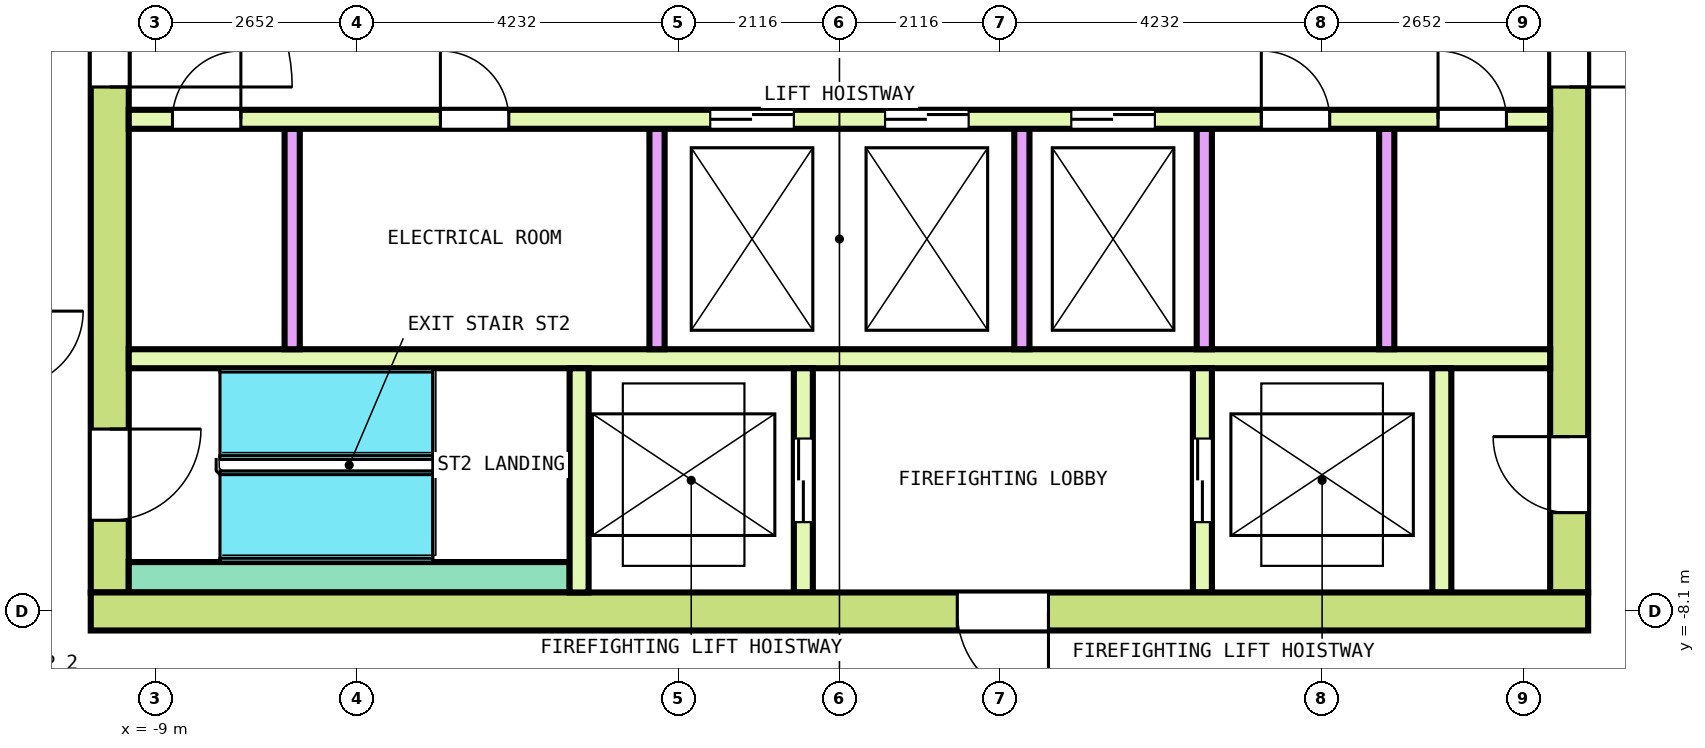
"""IFC4 building model, lengths in metres.
Left out: names, types, materials, properties, quantities, classifications, styles, units other than length and angle.
Written with IfcOpenShell. Run it as: python <this file> out.ifc"""

import sys

from ifc_helpers import new_model, si_unit, direction, frame, frame_2d, origin, place, context, subcontext, project, spatial, rectangle, extrude, element, fill, save


model = new_model("IFC4")
c1 = context("Model", 3, precision=1e-05, world=origin(), true_north=direction((0.0, 1.0)))
c2 = subcontext(c1, "Body", "Model", "MODEL_VIEW")
j1 = project(units=[si_unit("LENGTHUNIT", "METRE"), si_unit("PLANEANGLEUNIT", "RADIAN")], contexts=[c1])
p1 = place(None, origin())
s1 = spatial("IfcSite", under=j1, at=p1, CompositionType="ELEMENT")
p2 = place(p1, origin())
s2 = spatial("IfcBuilding", under=s1, at=p2, CompositionType="ELEMENT")
p3 = place(p2, frame((0.0, 0.0, 340.6)))
s3 = spatial("IfcBuildingStorey", under=s2, at=p3, CompositionType="ELEMENT", Elevation=340.6)
p4 = place(p3, frame((-9.85, -8.1, 0.0), z_axis=(0.0, 0.0, 1.0), x_axis=(1.0, 0.0, 0.0)))
e1 = element("IfcWall", 1, at=p4, inside=s3, PredefinedType="SHEAR", context=c2, shape_type="SweptSolid", body=[
    extrude(rectangle(XDim=19.7, YDim=0.5, at=frame_2d((9.85, 0.0))), origin(), (0.0, 0.0, 1.0), 3.8),
])
p5 = place(p4, frame((11.4, 0.0, 0.0)))
e2 = element("IfcOpeningElement", 2, at=p5, cuts=e1, PredefinedType="OPENING", context=c2, shape_type="SweptSolid", body=[
    extrude(rectangle(XDim=1.2, YDim=2.1, at=frame_2d((0.6, 1.05))), frame((0.0, 0.26, 0.0), z_axis=(0.0, -1.0, 0.0), x_axis=(1.0, 0.0, 0.0)), (0.0, 0.0, 1.0), 0.52),
])
p6 = place(p3, frame((-9.6, -7.85, 0.0), z_axis=(0.0, 0.0, 1.0), x_axis=(0.0, 1.0, 0.0)))
e3 = element("IfcWall", 3, at=p6, inside=s3, PredefinedType="SHEAR", context=c2, shape_type="SweptSolid", body=[
    extrude(rectangle(XDim=15.7, YDim=0.5, at=frame_2d((7.85, 0.0))), origin(), (0.0, 0.0, 1.0), 3.8),
])
p7 = place(p6, frame((6.65, 0.0, 0.0)))
e4 = element("IfcOpeningElement", 4, at=p7, cuts=e3, PredefinedType="OPENING", context=c2, shape_type="SweptSolid", body=[
    extrude(rectangle(XDim=2.4, YDim=2.1, at=frame_2d((1.2, 1.05))), frame((0.0, 0.26, 0.0), z_axis=(0.0, -1.0, 0.0), x_axis=(1.0, 0.0, 0.0)), (0.0, 0.0, 1.0), 0.52),
])
p8 = place(p6, frame((13.55, 0.0, 0.0)))
e5 = element("IfcOpeningElement", 5, at=p8, cuts=e3, PredefinedType="OPENING", context=c2, shape_type="SweptSolid", body=[
    extrude(rectangle(XDim=1.2, YDim=2.1, at=frame_2d((0.6, 1.05))), frame((0.0, 0.26, 0.0), z_axis=(0.0, -1.0, 0.0), x_axis=(1.0, 0.0, 0.0)), (0.0, 0.0, 1.0), 0.52),
])
p9 = place(p6, frame((0.95, 0.0, 0.0)))
e6 = element("IfcOpeningElement", 6, at=p9, cuts=e3, PredefinedType="OPENING", context=c2, shape_type="SweptSolid", body=[
    extrude(rectangle(XDim=1.2, YDim=2.1, at=frame_2d((0.6, 1.05))), frame((0.0, 0.26, 0.0), z_axis=(0.0, -1.0, 0.0), x_axis=(1.0, 0.0, 0.0)), (0.0, 0.0, 1.0), 0.52),
])
p10 = place(p3, frame((9.6, -7.85, 0.0), z_axis=(0.0, 0.0, 1.0), x_axis=(0.0, 1.0, 0.0)))
e7 = element("IfcWall", 7, at=p10, inside=s3, PredefinedType="SHEAR", context=c2, shape_type="SweptSolid", body=[
    extrude(rectangle(XDim=15.7, YDim=0.5, at=frame_2d((7.85, 0.0))), origin(), (0.0, 0.0, 1.0), 3.8),
])
p11 = place(p10, frame((6.65, 0.0, 0.0)))
e8 = element("IfcOpeningElement", 8, at=p11, cuts=e7, PredefinedType="OPENING", context=c2, shape_type="SweptSolid", body=[
    extrude(rectangle(XDim=2.4, YDim=2.1, at=frame_2d((1.2, 1.05))), frame((0.0, 0.26, 0.0), z_axis=(0.0, -1.0, 0.0), x_axis=(1.0, 0.0, 0.0)), (0.0, 0.0, 1.0), 0.52),
])
p12 = place(p10, frame((13.55, 0.0, 0.0)))
e9 = element("IfcOpeningElement", 9, at=p12, cuts=e7, PredefinedType="OPENING", context=c2, shape_type="SweptSolid", body=[
    extrude(rectangle(XDim=1.2, YDim=2.1, at=frame_2d((0.6, 1.05))), frame((0.0, 0.26, 0.0), z_axis=(0.0, -1.0, 0.0), x_axis=(1.0, 0.0, 0.0)), (0.0, 0.0, 1.0), 0.52),
])
p13 = place(p10, frame((1.05, 0.0, 0.0)))
e10 = element("IfcOpeningElement", 10, at=p13, cuts=e7, PredefinedType="OPENING", context=c2, shape_type="SweptSolid", body=[
    extrude(rectangle(XDim=1.0, YDim=2.1, at=frame_2d((0.5, 1.05))), frame((0.0, 0.26, 0.0), z_axis=(0.0, -1.0, 0.0), x_axis=(1.0, 0.0, 0.0)), (0.0, 0.0, 1.0), 0.52),
])
p14 = place(p3, frame((-9.35, -1.625, 0.0), z_axis=(0.0, 0.0, 1.0), x_axis=(1.0, 0.0, 0.0)))
e11 = element("IfcWall", 11, at=p14, inside=s3, PredefinedType="SOLIDWALL", context=c2, shape_type="SweptSolid", body=[
    extrude(rectangle(XDim=18.7, YDim=0.25, at=frame_2d((9.35, 0.0))), origin(), (0.0, 0.0, 1.0), 3.8),
])
p15 = place(p14, frame((7.65, 0.0, 0.0)))
e12 = element("IfcOpeningElement", 12, at=p15, cuts=e11, PredefinedType="OPENING", context=c2, shape_type="SweptSolid", body=[
    extrude(rectangle(XDim=1.1, YDim=2.1, at=frame_2d((0.55, 1.05))), frame((0.0, 0.135, 0.0), z_axis=(0.0, -1.0, 0.0), x_axis=(1.0, 0.0, 0.0)), (0.0, 0.0, 1.0), 0.27),
])
p16 = place(p14, frame((9.95, 0.0, 0.0)))
e13 = element("IfcOpeningElement", 13, at=p16, cuts=e11, PredefinedType="OPENING", context=c2, shape_type="SweptSolid", body=[
    extrude(rectangle(XDim=1.1, YDim=2.1, at=frame_2d((0.55, 1.05))), frame((0.0, 0.135, 0.0), z_axis=(0.0, -1.0, 0.0), x_axis=(1.0, 0.0, 0.0)), (0.0, 0.0, 1.0), 0.27),
])
p17 = place(p14, frame((12.4, 0.0, 0.0)))
e14 = element("IfcOpeningElement", 14, at=p17, cuts=e11, PredefinedType="OPENING", context=c2, shape_type="SweptSolid", body=[
    extrude(rectangle(XDim=1.1, YDim=2.1, at=frame_2d((0.55, 1.05))), frame((0.0, 0.135, 0.0), z_axis=(0.0, -1.0, 0.0), x_axis=(1.0, 0.0, 0.0)), (0.0, 0.0, 1.0), 0.27),
])
p18 = place(p14, frame((0.575, 0.0, 0.0)))
e15 = element("IfcOpeningElement", 15, at=p18, cuts=e11, PredefinedType="OPENING", context=c2, shape_type="SweptSolid", body=[
    extrude(rectangle(XDim=0.9, YDim=2.1, at=frame_2d((0.45, 1.05))), frame((0.0, 0.135, 0.0), z_axis=(0.0, -1.0, 0.0), x_axis=(1.0, 0.0, 0.0)), (0.0, 0.0, 1.0), 0.27),
])
p19 = place(p14, frame((4.1, 0.0, 0.0)))
e16 = element("IfcOpeningElement", 16, at=p19, cuts=e11, PredefinedType="OPENING", context=c2, shape_type="SweptSolid", body=[
    extrude(rectangle(XDim=0.9, YDim=2.1, at=frame_2d((0.45, 1.05))), frame((0.0, 0.135, 0.0), z_axis=(0.0, -1.0, 0.0), x_axis=(1.0, 0.0, 0.0)), (0.0, 0.0, 1.0), 0.27),
])
p20 = place(p14, frame((14.9, 0.0, 0.0)))
e17 = element("IfcOpeningElement", 17, at=p20, cuts=e11, PredefinedType="OPENING", context=c2, shape_type="SweptSolid", body=[
    extrude(rectangle(XDim=0.9, YDim=2.1, at=frame_2d((0.45, 1.05))), frame((0.0, 0.135, 0.0), z_axis=(0.0, -1.0, 0.0), x_axis=(1.0, 0.0, 0.0)), (0.0, 0.0, 1.0), 0.27),
])
p21 = place(p14, frame((17.225, 0.0, 0.0)))
e18 = element("IfcOpeningElement", 18, at=p21, cuts=e11, PredefinedType="OPENING", context=c2, shape_type="SweptSolid", body=[
    extrude(rectangle(XDim=0.9, YDim=2.1, at=frame_2d((0.45, 1.05))), frame((0.0, 0.135, 0.0), z_axis=(0.0, -1.0, 0.0), x_axis=(1.0, 0.0, 0.0)), (0.0, 0.0, 1.0), 0.27),
])
p22 = place(p3, frame((-9.35, -4.775, 0.0), z_axis=(0.0, 0.0, 1.0), x_axis=(1.0, 0.0, 0.0)))
e19 = element("IfcWall", 19, at=p22, inside=s3, PredefinedType="SOLIDWALL", context=c2, shape_type="SweptSolid", body=[
    extrude(rectangle(XDim=18.7, YDim=0.25, at=frame_2d((9.35, 0.0))), origin(), (0.0, 0.0, 1.0), 3.8),
])
for number, where, z_axis, x_axis in (
    (20, (-7.2, -4.65, 0.0), (0.0, 0.0, 1.0), (0.0, 1.0, 0.0)),
    (21, (-2.4, -4.65, 0.0), (0.0, 0.0, 1.0), (0.0, 1.0, 0.0)),
    (22, (2.4, -4.65, 0.0), (0.0, 0.0, 1.0), (0.0, 1.0, 0.0)),
    (23, (4.8, -4.65, 0.0), (0.0, 0.0, 1.0), (0.0, 1.0, 0.0)),
    (24, (7.2, -4.65, 0.0), (0.0, 0.0, 1.0), (0.0, 1.0, 0.0)),
):
    element("IfcWall", number, at=place(p3, frame(where, z_axis=z_axis, x_axis=x_axis)), inside=s3, PredefinedType="SOLIDWALL", context=c2, shape_type="SweptSolid", body=[
        extrude(rectangle(XDim=2.9, YDim=0.2, at=frame_2d((1.45, 0.0))), origin(), (0.0, 0.0, 1.0), 3.8),
    ])
p23 = place(p3, frame((-9.35, -7.65, 0.0), z_axis=(0.0, 0.0, 1.0), x_axis=(1.0, 0.0, 0.0)))
e25 = element("IfcWall", 25, at=p23, inside=s3, PredefinedType="SOLIDWALL", context=c2, shape_type="SweptSolid", body=[
    extrude(rectangle(XDim=5.8, YDim=0.4, at=frame_2d((2.9, 0.0))), origin(), (0.0, 0.0, 1.0), 3.8),
])
p24 = place(p3, frame((-3.425, -7.85, 0.0), z_axis=(0.0, 0.0, 1.0), x_axis=(0.0, 1.0, 0.0)))
e26 = element("IfcWall", 26, at=p24, inside=s3, PredefinedType="SOLIDWALL", context=c2, shape_type="SweptSolid", body=[
    extrude(rectangle(XDim=2.95, YDim=0.25, at=frame_2d((1.475, 0.0))), origin(), (0.0, 0.0, 1.0), 3.8),
])
p25 = place(p3, frame((-0.475, -7.85, 0.0), z_axis=(0.0, 0.0, 1.0), x_axis=(0.0, 1.0, 0.0)))
e27 = element("IfcWall", 27, at=p25, inside=s3, PredefinedType="SOLIDWALL", context=c2, shape_type="SweptSolid", body=[
    extrude(rectangle(XDim=2.95, YDim=0.25, at=frame_2d((1.475, 0.0))), origin(), (0.0, 0.0, 1.0), 3.8),
])
p26 = place(p25, frame((0.925, 0.0, 0.0)))
e28 = element("IfcOpeningElement", 28, at=p26, cuts=e27, PredefinedType="OPENING", context=c2, shape_type="SweptSolid", body=[
    extrude(rectangle(XDim=1.1, YDim=2.1, at=frame_2d((0.55, 1.05))), frame((0.0, 0.135, 0.0), z_axis=(0.0, -1.0, 0.0), x_axis=(1.0, 0.0, 0.0)), (0.0, 0.0, 1.0), 0.27),
])
p27 = place(p3, frame((4.775, -7.85, 0.0), z_axis=(0.0, 0.0, 1.0), x_axis=(0.0, 1.0, 0.0)))
e29 = element("IfcWall", 29, at=p27, inside=s3, PredefinedType="SOLIDWALL", context=c2, shape_type="SweptSolid", body=[
    extrude(rectangle(XDim=2.95, YDim=0.25, at=frame_2d((1.475, 0.0))), origin(), (0.0, 0.0, 1.0), 3.8),
])
p28 = place(p27, frame((0.925, 0.0, 0.0)))
e30 = element("IfcOpeningElement", 30, at=p28, cuts=e29, PredefinedType="OPENING", context=c2, shape_type="SweptSolid", body=[
    extrude(rectangle(XDim=1.1, YDim=2.1, at=frame_2d((0.55, 1.05))), frame((0.0, 0.135, 0.0), z_axis=(0.0, -1.0, 0.0), x_axis=(1.0, 0.0, 0.0)), (0.0, 0.0, 1.0), 0.27),
])
p29 = place(p3, frame((7.925, -7.85, 0.0), z_axis=(0.0, 0.0, 1.0), x_axis=(0.0, 1.0, 0.0)))
e31 = element("IfcWall", 31, at=p29, inside=s3, PredefinedType="SOLIDWALL", context=c2, shape_type="SweptSolid", body=[
    extrude(rectangle(XDim=2.95, YDim=0.25, at=frame_2d((1.475, 0.0))), origin(), (0.0, 0.0, 1.0), 3.8),
])
p30 = place(p15, origin())
e32 = element("IfcDoor", 32, at=p30, inside=s3, OperationType="DOUBLE_DOOR_SLIDING", PredefinedType="DOOR", context=c2, shape_type="SweptSolid", body=[
    extrude(rectangle(XDim=1.1, YDim=2.1, at=frame_2d((0.55, 1.05))), frame((0.0, 0.075, 0.0), z_axis=(0.0, -1.0, 0.0), x_axis=(1.0, 0.0, 0.0)), (0.0, 0.0, 1.0), 0.15),
])
fill(e12, e32)
p31 = place(p16, origin())
e33 = element("IfcDoor", 33, at=p31, inside=s3, OperationType="DOUBLE_DOOR_SLIDING", PredefinedType="DOOR", context=c2, shape_type="SweptSolid", body=[
    extrude(rectangle(XDim=1.1, YDim=2.1, at=frame_2d((0.55, 1.05))), frame((0.0, 0.075, 0.0), z_axis=(0.0, -1.0, 0.0), x_axis=(1.0, 0.0, 0.0)), (0.0, 0.0, 1.0), 0.15),
])
fill(e13, e33)
p32 = place(p17, origin())
e34 = element("IfcDoor", 34, at=p32, inside=s3, OperationType="DOUBLE_DOOR_SLIDING", PredefinedType="DOOR", context=c2, shape_type="SweptSolid", body=[
    extrude(rectangle(XDim=1.1, YDim=2.1, at=frame_2d((0.55, 1.05))), frame((0.0, 0.075, 0.0), z_axis=(0.0, -1.0, 0.0), x_axis=(1.0, 0.0, 0.0)), (0.0, 0.0, 1.0), 0.15),
])
fill(e14, e34)
p33 = place(p26, origin())
e35 = element("IfcDoor", 35, at=p33, inside=s3, OperationType="DOUBLE_DOOR_SLIDING", PredefinedType="DOOR", context=c2, shape_type="SweptSolid", body=[
    extrude(rectangle(XDim=1.1, YDim=2.1, at=frame_2d((0.55, 1.05))), frame((0.0, 0.075, 0.0), z_axis=(0.0, -1.0, 0.0), x_axis=(1.0, 0.0, 0.0)), (0.0, 0.0, 1.0), 0.15),
])
fill(e28, e35)
p34 = place(p28, origin())
e36 = element("IfcDoor", 36, at=p34, inside=s3, OperationType="DOUBLE_DOOR_SLIDING", PredefinedType="DOOR", context=c2, shape_type="SweptSolid", body=[
    extrude(rectangle(XDim=1.1, YDim=2.1, at=frame_2d((0.55, 1.05))), frame((0.0, 0.075, 0.0), z_axis=(0.0, -1.0, 0.0), x_axis=(1.0, 0.0, 0.0)), (0.0, 0.0, 1.0), 0.15),
])
fill(e30, e36)
p35 = place(p7, origin())
e37 = element("IfcDoor", 37, at=p35, inside=s3, OperationType="DOUBLE_DOOR_SINGLE_SWING", PredefinedType="DOOR", context=c2, shape_type="SweptSolid", body=[
    extrude(rectangle(XDim=2.4, YDim=2.1, at=frame_2d((1.2, 1.05))), frame((0.0, 0.2, 0.0), z_axis=(0.0, -1.0, 0.0), x_axis=(1.0, 0.0, 0.0)), (0.0, 0.0, 1.0), 0.4),
])
fill(e4, e37)
p36 = place(p11, origin())
e38 = element("IfcDoor", 38, at=p36, inside=s3, OperationType="DOUBLE_DOOR_SINGLE_SWING", PredefinedType="DOOR", context=c2, shape_type="SweptSolid", body=[
    extrude(rectangle(XDim=2.4, YDim=2.1, at=frame_2d((1.2, 1.05))), frame((0.0, 0.2, 0.0), z_axis=(0.0, -1.0, 0.0), x_axis=(1.0, 0.0, 0.0)), (0.0, 0.0, 1.0), 0.4),
])
fill(e8, e38)
p37 = place(p9, origin())
e39 = element("IfcDoor", 39, at=p37, inside=s3, OperationType="SINGLE_SWING_LEFT", PredefinedType="DOOR", context=c2, shape_type="SweptSolid", body=[
    extrude(rectangle(XDim=1.2, YDim=2.1, at=frame_2d((0.6, 1.05))), frame((0.0, 0.2, 0.0), z_axis=(0.0, -1.0, 0.0), x_axis=(1.0, 0.0, 0.0)), (0.0, 0.0, 1.0), 0.4),
])
fill(e6, e39)
p38 = place(p5, origin())
e40 = element("IfcDoor", 40, at=p38, inside=s3, OperationType="SINGLE_SWING_LEFT", PredefinedType="DOOR", context=c2, shape_type="SweptSolid", body=[
    extrude(rectangle(XDim=1.2, YDim=2.1, at=frame_2d((0.6, 1.05))), frame((0.0, 0.2, 0.0), z_axis=(0.0, -1.0, 0.0), x_axis=(1.0, 0.0, 0.0)), (0.0, 0.0, 1.0), 0.4),
])
fill(e2, e40)
p39 = place(p13, origin())
e41 = element("IfcDoor", 41, at=p39, inside=s3, OperationType="SINGLE_SWING_LEFT", PredefinedType="DOOR", context=c2, shape_type="SweptSolid", body=[
    extrude(rectangle(XDim=1.0, YDim=2.1, at=frame_2d((0.5, 1.05))), frame((0.0, 0.2, 0.0), z_axis=(0.0, -1.0, 0.0), x_axis=(1.0, 0.0, 0.0)), (0.0, 0.0, 1.0), 0.4),
])
fill(e10, e41)
p40 = place(p18, origin())
e42 = element("IfcDoor", 42, at=p40, inside=s3, OperationType="SINGLE_SWING_LEFT", PredefinedType="DOOR", context=c2, shape_type="SweptSolid", body=[
    extrude(rectangle(XDim=0.9, YDim=2.1, at=frame_2d((0.45, 1.05))), frame((0.0, 0.075, 0.0), z_axis=(0.0, -1.0, 0.0), x_axis=(1.0, 0.0, 0.0)), (0.0, 0.0, 1.0), 0.15),
])
fill(e15, e42)
p41 = place(p19, origin())
e43 = element("IfcDoor", 43, at=p41, inside=s3, OperationType="SINGLE_SWING_RIGHT", PredefinedType="DOOR", context=c2, shape_type="SweptSolid", body=[
    extrude(rectangle(XDim=0.9, YDim=2.1, at=frame_2d((0.45, 1.05))), frame((0.0, 0.075, 0.0), z_axis=(0.0, -1.0, 0.0), x_axis=(1.0, 0.0, 0.0)), (0.0, 0.0, 1.0), 0.15),
])
fill(e16, e43)
p42 = place(p20, origin())
e44 = element("IfcDoor", 44, at=p42, inside=s3, OperationType="SINGLE_SWING_LEFT", PredefinedType="DOOR", context=c2, shape_type="SweptSolid", body=[
    extrude(rectangle(XDim=0.9, YDim=2.1, at=frame_2d((0.45, 1.05))), frame((0.0, 0.075, 0.0), z_axis=(0.0, -1.0, 0.0), x_axis=(1.0, 0.0, 0.0)), (0.0, 0.0, 1.0), 0.15),
])
fill(e17, e44)
p43 = place(p21, origin())
e45 = element("IfcDoor", 45, at=p43, inside=s3, OperationType="SINGLE_SWING_RIGHT", PredefinedType="DOOR", context=c2, shape_type="SweptSolid", body=[
    extrude(rectangle(XDim=0.9, YDim=2.1, at=frame_2d((0.45, 1.05))), frame((0.0, 0.075, 0.0), z_axis=(0.0, -1.0, 0.0), x_axis=(1.0, 0.0, 0.0)), (0.0, 0.0, 1.0), 0.15),
])
fill(e18, e45)
save(model, sys.argv[1])
